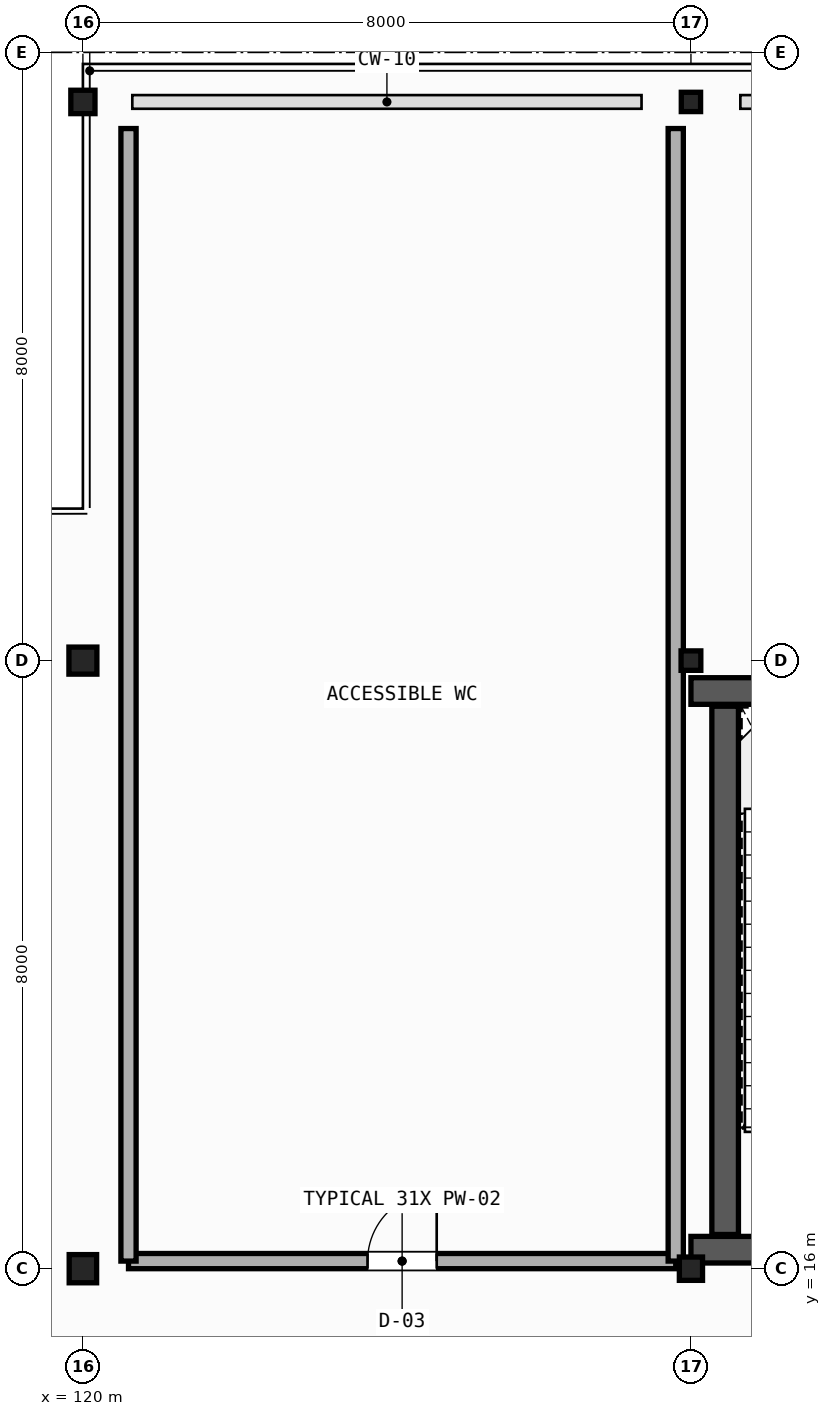
"""IFC4 building model, lengths in metres.
Left out: names, types, materials, properties, quantities, classifications, styles, units other than length and angle.
Written with IfcOpenShell. Run it as: python <this file> out.ifc"""

import sys

from ifc_helpers import new_model, si_unit, direction, frame, frame_2d, origin, origin_2d, place, context, subcontext, project, spatial, rectangle, i_section, extrude, element, fill, save


model = new_model("IFC4")
c1 = context("Model", 3, precision=1e-05, world=origin(), true_north=direction((0.0, 1.0)))
c2 = subcontext(c1, "Body", "Model", "MODEL_VIEW")
j1 = project(units=[si_unit("LENGTHUNIT", "METRE"), si_unit("PLANEANGLEUNIT", "RADIAN")], contexts=[c1])
p1 = place(None, origin())
s1 = spatial("IfcSite", under=j1, at=p1, CompositionType="ELEMENT")
p2 = place(p1, origin())
s2 = spatial("IfcBuilding", under=s1, at=p2, CompositionType="ELEMENT")
p3 = place(p2, frame((0.0, 0.0, 5.4)))
s3 = spatial("IfcBuildingStorey", under=s2, at=p3, CompositionType="ELEMENT", Elevation=5.4)
p4 = place(p3, frame((120.0, 16.0, 0.0), z_axis=(0.0, 0.0, 1.0), x_axis=(0.0, 1.0, 0.0)))
e1 = element("IfcColumn", 1, at=p4, inside=s3, PredefinedType="COLUMN", context=c2, shape_type="SweptSolid", body=[
    extrude(i_section(OverallWidth=0.371, OverallDepth=0.361, WebThickness=0.012, FlangeThickness=0.02, FilletRadius=0.015, at=origin_2d()), origin(), (0.0, 0.0, 1.0), 4.54),
])
p5 = place(p3, frame((120.0, 24.0, 0.0), z_axis=(0.0, 0.0, 1.0), x_axis=(1.0, 0.0, 0.0)))
e2 = element("IfcColumn", 2, at=p5, inside=s3, PredefinedType="COLUMN", context=c2, shape_type="SweptSolid", body=[
    extrude(i_section(OverallWidth=0.368, OverallDepth=0.356, WebThickness=0.011, FlangeThickness=0.018, FilletRadius=0.015, at=origin_2d()), origin(), (0.0, 0.0, 1.0), 4.54),
])
p6 = place(p3, frame((120.0, 31.35, 0.0), z_axis=(0.0, 0.0, 1.0), x_axis=(0.0, 1.0, 0.0)))
e3 = element("IfcColumn", 3, at=p6, inside=s3, PredefinedType="COLUMN", context=c2, shape_type="SweptSolid", body=[
    extrude(i_section(OverallWidth=0.308, OverallDepth=0.318, WebThickness=0.013, FlangeThickness=0.021, FilletRadius=0.013, at=origin_2d()), origin(), (0.0, 0.0, 1.0), 4.8),
])
p7 = place(p3, frame((128.0, 16.0, 0.0), z_axis=(0.0, 0.0, 1.0), x_axis=(1.0, 0.0, 0.0)))
e4 = element("IfcColumn", 4, at=p7, inside=s3, PredefinedType="COLUMN", context=c2, shape_type="SweptSolid", body=[
    extrude(i_section(OverallWidth=0.305, OverallDepth=0.307, WebThickness=0.01, FlangeThickness=0.015, FilletRadius=0.013, at=origin_2d()), origin(), (0.0, 0.0, 1.0), 4.54),
])
p8 = place(p3, frame((128.0, 24.0, 0.0), z_axis=(0.0, 0.0, 1.0), x_axis=(0.0, 1.0, 0.0)))
e5 = element("IfcColumn", 5, at=p8, inside=s3, PredefinedType="COLUMN", context=c2, shape_type="SweptSolid", body=[
    extrude(i_section(OverallWidth=0.256, OverallDepth=0.26, WebThickness=0.011, FlangeThickness=0.017, FilletRadius=0.011, at=origin_2d()), origin(), (0.0, 0.0, 1.0), 4.54),
])
p9 = place(p3, frame((128.0, 31.35, 0.0), z_axis=(0.0, 0.0, 1.0), x_axis=(1.0, 0.0, 0.0)))
e6 = element("IfcColumn", 6, at=p9, inside=s3, PredefinedType="COLUMN", context=c2, shape_type="SweptSolid", body=[
    extrude(i_section(OverallWidth=0.254, OverallDepth=0.254, WebThickness=0.009, FlangeThickness=0.014, FilletRadius=0.011, at=origin_2d()), origin(), (0.0, 0.0, 1.0), 4.8),
])
p10 = place(p3, frame((128.0, 16.25, 0.0), z_axis=(0.0, 0.0, 1.0), x_axis=(1.0, 0.0, 0.0)))
e7 = element("IfcWall", 7, at=p10, inside=s3, PredefinedType="SHEAR", context=c2, shape_type="SweptSolid", body=[
    extrude(rectangle(XDim=5.85, YDim=0.35, at=frame_2d((2.925, 0.0))), origin(), (0.0, 0.0, 1.0), 4.53),
])
p11 = place(p10, frame((1.4, 0.0, 0.0)))
e8 = element("IfcOpeningElement", 8, at=p11, cuts=e7, PredefinedType="OPENING", context=c2, shape_type="SweptSolid", body=[
    extrude(rectangle(XDim=1.05, YDim=2.1, at=frame_2d((0.525, 1.05))), frame((0.0, 0.185, 0.0), z_axis=(0.0, -1.0, 0.0), x_axis=(1.0, 0.0, 0.0)), (0.0, 0.0, 1.0), 0.37),
])
p12 = place(p10, frame((4.25, 0.0, 0.0)))
e9 = element("IfcOpeningElement", 9, at=p12, cuts=e7, PredefinedType="OPENING", context=c2, shape_type="SweptSolid", body=[
    extrude(rectangle(XDim=1.0, YDim=2.15, at=frame_2d((0.5, 1.075))), frame((0.0, 0.185, 0.0), z_axis=(0.0, -1.0, 0.0), x_axis=(1.0, 0.0, 0.0)), (0.0, 0.0, 1.0), 0.37),
])
p13 = place(p3, frame((128.0, 23.6, 0.0), z_axis=(0.0, 0.0, 1.0), x_axis=(1.0, 0.0, 0.0)))
e10 = element("IfcWall", 10, at=p13, inside=s3, PredefinedType="SHEAR", context=c2, shape_type="SweptSolid", body=[
    extrude(rectangle(XDim=5.85, YDim=0.35, at=frame_2d((2.925, 0.0))), origin(), (0.0, 0.0, 1.0), 4.53),
])
p14 = place(p3, frame((128.45, 16.45, 0.0), z_axis=(0.0, 0.0, 1.0), x_axis=(0.0, 1.0, 0.0)))
e11 = element("IfcWall", 11, at=p14, inside=s3, PredefinedType="SHEAR", context=c2, shape_type="SweptSolid", body=[
    extrude(rectangle(XDim=6.95, YDim=0.35, at=frame_2d((3.475, 0.0))), origin(), (0.0, 0.0, 1.0), 4.53),
])
p15 = place(p3, frame((120.6, 16.1, 0.0), z_axis=(0.0, 0.0, 1.0), x_axis=(1.0, 0.0, 0.0)))
e12 = element("IfcWall", 12, at=p15, inside=s3, PredefinedType="PLUMBINGWALL", context=c2, shape_type="SweptSolid", body=[
    extrude(rectangle(XDim=7.2, YDim=0.2, at=frame_2d((3.6, 0.0))), origin(), (0.0, 0.0, 1.0), 3.892),
])
p16 = place(p15, frame((3.145, 0.0, 0.0)))
e13 = element("IfcOpeningElement", 13, at=p16, cuts=e12, PredefinedType="OPENING", context=c2, shape_type="SweptSolid", body=[
    extrude(rectangle(XDim=0.91, YDim=2.1, at=frame_2d((0.455, 1.05))), frame((0.0, 0.11, 0.0), z_axis=(0.0, -1.0, 0.0), x_axis=(1.0, 0.0, 0.0)), (0.0, 0.0, 1.0), 0.22),
])
p17 = place(p3, frame((120.6, 16.1, 0.0), z_axis=(0.0, 0.0, 1.0), x_axis=(0.0, 1.0, 0.0)))
e14 = element("IfcWall", 14, at=p17, inside=s3, PredefinedType="PLUMBINGWALL", context=c2, shape_type="SweptSolid", body=[
    extrude(rectangle(XDim=14.9, YDim=0.2, at=frame_2d((7.45, 0.0))), origin(), (0.0, 0.0, 1.0), 3.898),
])
p18 = place(p3, frame((127.8, 16.1, 0.0), z_axis=(0.0, 0.0, 1.0), x_axis=(0.0, 1.0, 0.0)))
e15 = element("IfcWall", 15, at=p18, inside=s3, PredefinedType="PLUMBINGWALL", context=c2, shape_type="SweptSolid", body=[
    extrude(rectangle(XDim=14.9, YDim=0.2, at=frame_2d((7.45, 0.0))), origin(), (0.0, 0.0, 1.0), 3.738),
])
p19 = place(p16, origin())
e16 = element("IfcDoor", 16, at=p19, inside=s3, OperationType="SINGLE_SWING_RIGHT", PredefinedType="DOOR", context=c2, shape_type="SweptSolid", body=[
    extrude(rectangle(XDim=0.91, YDim=2.1, at=frame_2d((0.455, 1.05))), frame((0.0, 0.025, 0.0), z_axis=(0.0, -1.0, 0.0), x_axis=(1.0, 0.0, 0.0)), (0.0, 0.0, 1.0), 0.05),
])
fill(e13, e16)
save(model, sys.argv[1])
